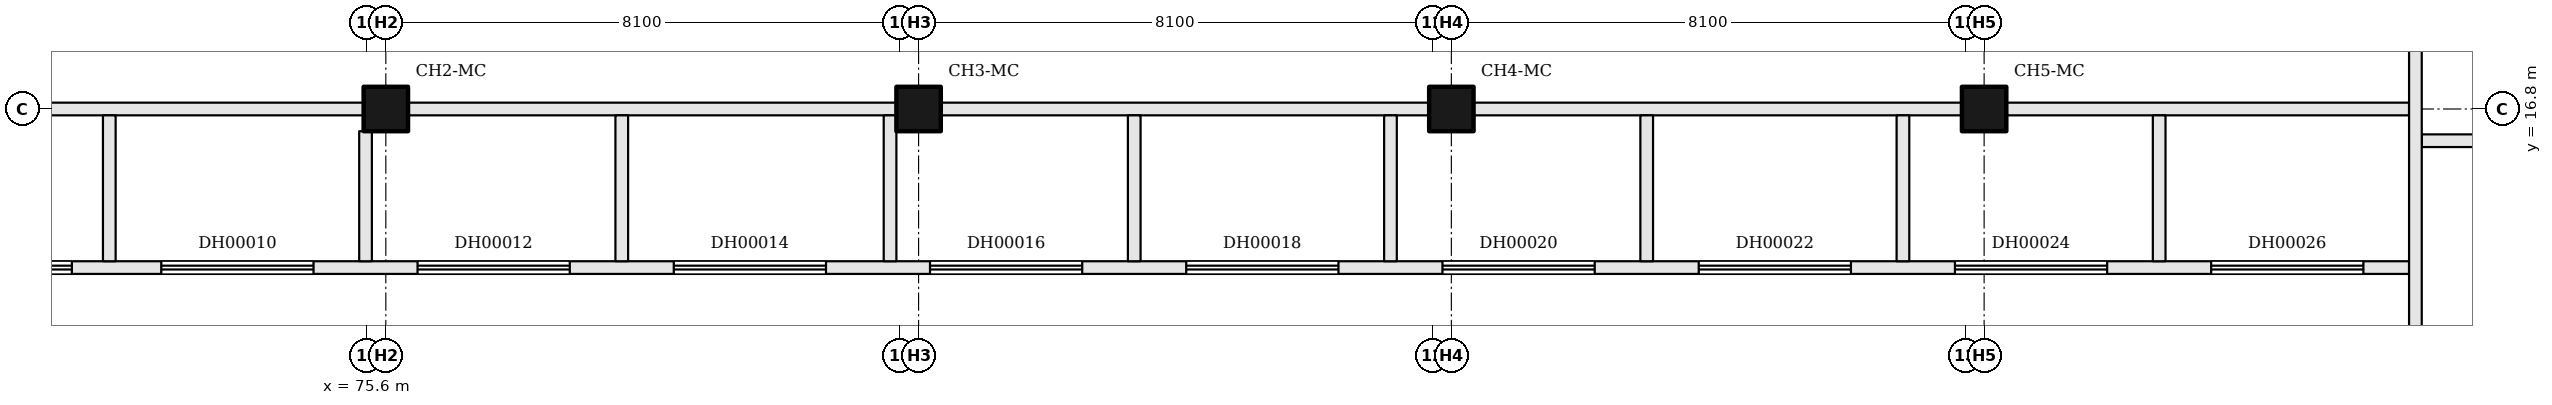
"""IFC4 building model, lengths in metres.
Left out: names, types, materials, properties, quantities, classifications, styles, units other than length and angle.
Written with IfcOpenShell. Run it as: python <this file> out.ifc"""

import sys

from ifc_helpers import new_model, si_unit, direction, frame, frame_2d, origin, origin_2d, place, context, subcontext, project, spatial, rectangle, extrude, element, fill, save


model = new_model("IFC4")
c1 = context("Model", 3, precision=1e-05, world=origin(), true_north=direction((0.0, 1.0)))
c2 = subcontext(c1, "Body", "Model", "MODEL_VIEW")
j1 = project(units=[si_unit("LENGTHUNIT", "METRE"), si_unit("PLANEANGLEUNIT", "RADIAN")], contexts=[c1])
p1 = place(None, origin())
s1 = spatial("IfcSite", under=j1, at=p1, CompositionType="ELEMENT")
p2 = place(p1, origin())
s2 = spatial("IfcBuilding", under=s1, at=p2, CompositionType="ELEMENT")
p3 = place(p2, origin())
s3 = spatial("IfcBuildingStorey", under=s2, at=p3, CompositionType="ELEMENT", Elevation=0.0)
for number, where, z_axis, x_axis in (
    (1, (75.9, 16.8, -0.2), (0.0, 0.0, 1.0), (1.0, 0.0, 0.0)),
    (2, (84.3, 16.8, -0.2), (0.0, 0.0, 1.0), (1.0, 0.0, 0.0)),
    (3, (92.7, 16.8, -0.2), (0.0, 0.0, 1.0), (1.0, 0.0, 0.0)),
    (4, (101.1, 16.8, -0.2), (0.0, 0.0, 1.0), (1.0, 0.0, 0.0)),
):
    element("IfcColumn", number, at=place(p3, frame(where, z_axis=z_axis, x_axis=x_axis)), inside=s3, PredefinedType="COLUMN", context=c2, shape_type="SweptSolid", body=[
        extrude(rectangle(XDim=0.7, YDim=0.7, at=origin_2d()), origin(), (0.0, 0.0, 1.0), 8.9),
    ])
p4 = place(p3, frame((68.35, 14.3, 0.0), z_axis=(0.0, 0.0, 1.0), x_axis=(1.0, 0.0, 0.0)))
e5 = element("IfcWall", 5, at=p4, inside=s3, PredefinedType="PARTITIONING", context=c2, shape_type="SweptSolid", body=[
    extrude(rectangle(XDim=39.45, YDim=0.2, at=frame_2d((19.725, 0.0))), origin(), (0.0, 0.0, 1.0), 8.7),
])
p5 = place(p4, frame((0.2, 0.0, 0.0)))
e6 = element("IfcOpeningElement", 6, at=p5, cuts=e5, PredefinedType="OPENING", context=c2, shape_type="SweptSolid", body=[
    extrude(rectangle(XDim=2.4, YDim=2.4, at=frame_2d((1.2, 1.2))), frame((0.0, 0.11, 0.0), z_axis=(0.0, -1.0, 0.0), x_axis=(1.0, 0.0, 0.0)), (0.0, 0.0, 1.0), 0.22),
])
p6 = place(p4, frame((4.01, 0.0, 0.0)))
e7 = element("IfcOpeningElement", 7, at=p6, cuts=e5, PredefinedType="OPENING", context=c2, shape_type="SweptSolid", body=[
    extrude(rectangle(XDim=2.4, YDim=2.4, at=frame_2d((1.2, 1.2))), frame((0.0, 0.11, 0.0), z_axis=(0.0, -1.0, 0.0), x_axis=(1.0, 0.0, 0.0)), (0.0, 0.0, 1.0), 0.22),
])
p7 = place(p4, frame((8.05, 0.0, 0.0)))
e8 = element("IfcOpeningElement", 8, at=p7, cuts=e5, PredefinedType="OPENING", context=c2, shape_type="SweptSolid", body=[
    extrude(rectangle(XDim=2.4, YDim=2.4, at=frame_2d((1.2, 1.2))), frame((0.0, 0.11, 0.0), z_axis=(0.0, -1.0, 0.0), x_axis=(1.0, 0.0, 0.0)), (0.0, 0.0, 1.0), 0.22),
])
p8 = place(p4, frame((12.09, 0.0, 0.0)))
e9 = element("IfcOpeningElement", 9, at=p8, cuts=e5, PredefinedType="OPENING", context=c2, shape_type="SweptSolid", body=[
    extrude(rectangle(XDim=2.4, YDim=2.4, at=frame_2d((1.2, 1.2))), frame((0.0, 0.11, 0.0), z_axis=(0.0, -1.0, 0.0), x_axis=(1.0, 0.0, 0.0)), (0.0, 0.0, 1.0), 0.22),
])
p9 = place(p4, frame((16.13, 0.0, 0.0)))
e10 = element("IfcOpeningElement", 10, at=p9, cuts=e5, PredefinedType="OPENING", context=c2, shape_type="SweptSolid", body=[
    extrude(rectangle(XDim=2.4, YDim=2.4, at=frame_2d((1.2, 1.2))), frame((0.0, 0.11, 0.0), z_axis=(0.0, -1.0, 0.0), x_axis=(1.0, 0.0, 0.0)), (0.0, 0.0, 1.0), 0.22),
])
p10 = place(p4, frame((20.17, 0.0, 0.0)))
e11 = element("IfcOpeningElement", 11, at=p10, cuts=e5, PredefinedType="OPENING", context=c2, shape_type="SweptSolid", body=[
    extrude(rectangle(XDim=2.4, YDim=2.4, at=frame_2d((1.2, 1.2))), frame((0.0, 0.11, 0.0), z_axis=(0.0, -1.0, 0.0), x_axis=(1.0, 0.0, 0.0)), (0.0, 0.0, 1.0), 0.22),
])
p11 = place(p4, frame((24.21, 0.0, 0.0)))
e12 = element("IfcOpeningElement", 12, at=p11, cuts=e5, PredefinedType="OPENING", context=c2, shape_type="SweptSolid", body=[
    extrude(rectangle(XDim=2.4, YDim=2.4, at=frame_2d((1.2, 1.2))), frame((0.0, 0.11, 0.0), z_axis=(0.0, -1.0, 0.0), x_axis=(1.0, 0.0, 0.0)), (0.0, 0.0, 1.0), 0.22),
])
p12 = place(p4, frame((28.25, 0.0, 0.0)))
e13 = element("IfcOpeningElement", 13, at=p12, cuts=e5, PredefinedType="OPENING", context=c2, shape_type="SweptSolid", body=[
    extrude(rectangle(XDim=2.4, YDim=2.4, at=frame_2d((1.2, 1.2))), frame((0.0, 0.11, 0.0), z_axis=(0.0, -1.0, 0.0), x_axis=(1.0, 0.0, 0.0)), (0.0, 0.0, 1.0), 0.22),
])
p13 = place(p4, frame((32.29, 0.0, 0.0)))
e14 = element("IfcOpeningElement", 14, at=p13, cuts=e5, PredefinedType="OPENING", context=c2, shape_type="SweptSolid", body=[
    extrude(rectangle(XDim=2.4, YDim=2.4, at=frame_2d((1.2, 1.2))), frame((0.0, 0.11, 0.0), z_axis=(0.0, -1.0, 0.0), x_axis=(1.0, 0.0, 0.0)), (0.0, 0.0, 1.0), 0.22),
])
p14 = place(p4, frame((36.33, 0.0, 0.0)))
e15 = element("IfcOpeningElement", 15, at=p14, cuts=e5, PredefinedType="OPENING", context=c2, shape_type="SweptSolid", body=[
    extrude(rectangle(XDim=2.4, YDim=2.4, at=frame_2d((1.2, 1.2))), frame((0.0, 0.11, 0.0), z_axis=(0.0, -1.0, 0.0), x_axis=(1.0, 0.0, 0.0)), (0.0, 0.0, 1.0), 0.22),
])
p15 = place(p3, frame((108.0, 16.3, 0.0), z_axis=(0.0, 0.0, 1.0), x_axis=(1.0, 0.0, 0.0)))
e16 = element("IfcWall", 16, at=p15, inside=s3, PredefinedType="PARTITIONING", context=c2, shape_type="SweptSolid", body=[
    extrude(rectangle(XDim=9.9, YDim=0.2, at=frame_2d((4.95, 0.0))), origin(), (0.0, 0.0, 1.0), 8.7),
])
p16 = place(p15, frame((1.7, 0.0, 0.0)))
e17 = element("IfcOpeningElement", 17, at=p16, cuts=e16, PredefinedType="OPENING", context=c2, shape_type="SweptSolid", body=[
    extrude(rectangle(XDim=1.4, YDim=2.1, at=frame_2d((0.7, 1.05))), frame((0.0, 0.11, 0.0), z_axis=(0.0, -1.0, 0.0), x_axis=(1.0, 0.0, 0.0)), (0.0, 0.0, 1.0), 0.22),
])
p17 = place(p15, frame((6.7, 0.0, 0.0)))
e18 = element("IfcOpeningElement", 18, at=p17, cuts=e16, PredefinedType="OPENING", context=c2, shape_type="SweptSolid", body=[
    extrude(rectangle(XDim=1.4, YDim=2.1, at=frame_2d((0.7, 1.05))), frame((0.0, 0.11, 0.0), z_axis=(0.0, -1.0, 0.0), x_axis=(1.0, 0.0, 0.0)), (0.0, 0.0, 1.0), 0.22),
])
p18 = place(p3, frame((69.05, 16.8, 0.0), z_axis=(0.0, 0.0, 1.0), x_axis=(1.0, 0.0, 0.0)))
e19 = element("IfcWall", 19, at=p18, inside=s3, PredefinedType="PARTITIONING", context=c2, shape_type="SweptSolid", body=[
    extrude(rectangle(XDim=6.5, YDim=0.2, at=frame_2d((3.25, 0.0))), origin(), (0.0, 0.0, 1.0), 8.7),
])
p19 = place(p3, frame((76.25, 16.8, 0.0), z_axis=(0.0, 0.0, 1.0), x_axis=(1.0, 0.0, 0.0)))
e20 = element("IfcWall", 20, at=p19, inside=s3, PredefinedType="PARTITIONING", context=c2, shape_type="SweptSolid", body=[
    extrude(rectangle(XDim=7.7, YDim=0.2, at=frame_2d((3.85, 0.0))), origin(), (0.0, 0.0, 1.0), 8.7),
])
p20 = place(p3, frame((84.65, 16.8, 0.0), z_axis=(0.0, 0.0, 1.0), x_axis=(1.0, 0.0, 0.0)))
e21 = element("IfcWall", 21, at=p20, inside=s3, PredefinedType="PARTITIONING", context=c2, shape_type="SweptSolid", body=[
    extrude(rectangle(XDim=7.7, YDim=0.2, at=frame_2d((3.85, 0.0))), origin(), (0.0, 0.0, 1.0), 8.7),
])
p21 = place(p3, frame((93.05, 16.8, 0.0), z_axis=(0.0, 0.0, 1.0), x_axis=(1.0, 0.0, 0.0)))
e22 = element("IfcWall", 22, at=p21, inside=s3, PredefinedType="PARTITIONING", context=c2, shape_type="SweptSolid", body=[
    extrude(rectangle(XDim=7.7, YDim=0.2, at=frame_2d((3.85, 0.0))), origin(), (0.0, 0.0, 1.0), 8.7),
])
p22 = place(p3, frame((101.45, 16.8, 0.0), z_axis=(0.0, 0.0, 1.0), x_axis=(1.0, 0.0, 0.0)))
e23 = element("IfcWall", 23, at=p22, inside=s3, PredefinedType="PARTITIONING", context=c2, shape_type="SweptSolid", body=[
    extrude(rectangle(XDim=6.35, YDim=0.2, at=frame_2d((3.175, 0.0))), origin(), (0.0, 0.0, 1.0), 8.7),
])
p23 = place(p3, frame((71.54, 14.4, 0.0), z_axis=(0.0, 0.0, 1.0), x_axis=(0.0, 1.0, 0.0)))
e24 = element("IfcWall", 24, at=p23, inside=s3, PredefinedType="PARTITIONING", context=c2, shape_type="SweptSolid", body=[
    extrude(rectangle(XDim=2.3, YDim=0.2, at=frame_2d((1.15, 0.0))), origin(), (0.0, 0.0, 1.0), 8.7),
])
p24 = place(p3, frame((75.58, 14.4, 0.0), z_axis=(0.0, 0.0, 1.0), x_axis=(0.0, 1.0, 0.0)))
e25 = element("IfcWall", 25, at=p24, inside=s3, PredefinedType="PARTITIONING", context=c2, shape_type="SweptSolid", body=[
    extrude(rectangle(XDim=2.05, YDim=0.2, at=frame_2d((1.025, 0.0))), origin(), (0.0, 0.0, 1.0), 8.7),
])
for number, where, z_axis, x_axis in (
    (26, (79.62, 14.4, 0.0), (0.0, 0.0, 1.0), (0.0, 1.0, 0.0)),
    (27, (83.85, 14.4, 0.0), (0.0, 0.0, 1.0), (0.0, 1.0, 0.0)),
    (28, (87.7, 14.4, 0.0), (0.0, 0.0, 1.0), (0.0, 1.0, 0.0)),
    (29, (91.74, 14.4, 0.0), (0.0, 0.0, 1.0), (0.0, 1.0, 0.0)),
    (30, (95.78, 14.4, 0.0), (0.0, 0.0, 1.0), (0.0, 1.0, 0.0)),
    (31, (99.82, 14.4, 0.0), (0.0, 0.0, 1.0), (0.0, 1.0, 0.0)),
    (32, (103.86, 14.4, 0.0), (0.0, 0.0, 1.0), (0.0, 1.0, 0.0)),
):
    element("IfcWall", number, at=place(p3, frame(where, z_axis=z_axis, x_axis=x_axis)), inside=s3, PredefinedType="PARTITIONING", context=c2, shape_type="SweptSolid", body=[
        extrude(rectangle(XDim=2.3, YDim=0.2, at=frame_2d((1.15, 0.0))), origin(), (0.0, 0.0, 1.0), 8.7),
    ])
p25 = place(p3, frame((107.9, 8.5, 0.0), z_axis=(0.0, 0.0, 1.0), x_axis=(0.0, 1.0, 0.0)))
e33 = element("IfcWall", 33, at=p25, inside=s3, PredefinedType="PARTITIONING", context=c2, shape_type="SweptSolid", body=[
    extrude(rectangle(XDim=25.1, YDim=0.2, at=frame_2d((12.55, 0.0))), origin(), (0.0, 0.0, 1.0), 8.7),
])
p26 = place(p25, frame((3.8, 0.0, 0.0)))
e34 = element("IfcOpeningElement", 34, at=p26, cuts=e33, PredefinedType="OPENING", context=c2, shape_type="SweptSolid", body=[
    extrude(rectangle(XDim=1.0, YDim=2.1, at=frame_2d((0.5, 1.05))), frame((0.0, 0.11, 0.0), z_axis=(0.0, -1.0, 0.0), x_axis=(1.0, 0.0, 0.0)), (0.0, 0.0, 1.0), 0.22),
])
p27 = place(p25, frame((10.0, 0.0, 0.0)))
e35 = element("IfcOpeningElement", 35, at=p27, cuts=e33, PredefinedType="OPENING", context=c2, shape_type="SweptSolid", body=[
    extrude(rectangle(XDim=1.0, YDim=2.1, at=frame_2d((0.5, 1.05))), frame((0.0, 0.11, 0.0), z_axis=(0.0, -1.0, 0.0), x_axis=(1.0, 0.0, 0.0)), (0.0, 0.0, 1.0), 0.22),
])
p28 = place(p25, frame((22.5, 0.0, 0.0)))
e36 = element("IfcOpeningElement", 36, at=p28, cuts=e33, PredefinedType="OPENING", context=c2, shape_type="SweptSolid", body=[
    extrude(rectangle(XDim=1.0, YDim=2.1, at=frame_2d((0.5, 1.05))), frame((0.0, 0.11, 0.0), z_axis=(0.0, -1.0, 0.0), x_axis=(1.0, 0.0, 0.0)), (0.0, 0.0, 1.0), 0.22),
])
p29 = place(p5, origin())
e37 = element("IfcDoor", 37, at=p29, inside=s3, OperationType="ROLLINGUP", PredefinedType="DOOR", context=c2, shape_type="SweptSolid", body=[
    extrude(rectangle(XDim=2.4, YDim=2.4, at=frame_2d((1.2, 1.2))), frame((0.0, 0.025, 0.0), z_axis=(0.0, -1.0, 0.0), x_axis=(1.0, 0.0, 0.0)), (0.0, 0.0, 1.0), 0.05),
])
fill(e6, e37)
p30 = place(p6, origin())
e38 = element("IfcDoor", 38, at=p30, inside=s3, OperationType="ROLLINGUP", PredefinedType="DOOR", context=c2, shape_type="SweptSolid", body=[
    extrude(rectangle(XDim=2.4, YDim=2.4, at=frame_2d((1.2, 1.2))), frame((0.0, 0.025, 0.0), z_axis=(0.0, -1.0, 0.0), x_axis=(1.0, 0.0, 0.0)), (0.0, 0.0, 1.0), 0.05),
])
fill(e7, e38)
p31 = place(p7, origin())
e39 = element("IfcDoor", 39, at=p31, inside=s3, OperationType="ROLLINGUP", PredefinedType="DOOR", context=c2, shape_type="SweptSolid", body=[
    extrude(rectangle(XDim=2.4, YDim=2.4, at=frame_2d((1.2, 1.2))), frame((0.0, 0.025, 0.0), z_axis=(0.0, -1.0, 0.0), x_axis=(1.0, 0.0, 0.0)), (0.0, 0.0, 1.0), 0.05),
])
fill(e8, e39)
p32 = place(p8, origin())
e40 = element("IfcDoor", 40, at=p32, inside=s3, OperationType="ROLLINGUP", PredefinedType="DOOR", context=c2, shape_type="SweptSolid", body=[
    extrude(rectangle(XDim=2.4, YDim=2.4, at=frame_2d((1.2, 1.2))), frame((0.0, 0.025, 0.0), z_axis=(0.0, -1.0, 0.0), x_axis=(1.0, 0.0, 0.0)), (0.0, 0.0, 1.0), 0.05),
])
fill(e9, e40)
p33 = place(p9, origin())
e41 = element("IfcDoor", 41, at=p33, inside=s3, OperationType="ROLLINGUP", PredefinedType="DOOR", context=c2, shape_type="SweptSolid", body=[
    extrude(rectangle(XDim=2.4, YDim=2.4, at=frame_2d((1.2, 1.2))), frame((0.0, 0.025, 0.0), z_axis=(0.0, -1.0, 0.0), x_axis=(1.0, 0.0, 0.0)), (0.0, 0.0, 1.0), 0.05),
])
fill(e10, e41)
p34 = place(p10, origin())
e42 = element("IfcDoor", 42, at=p34, inside=s3, OperationType="ROLLINGUP", PredefinedType="DOOR", context=c2, shape_type="SweptSolid", body=[
    extrude(rectangle(XDim=2.4, YDim=2.4, at=frame_2d((1.2, 1.2))), frame((0.0, 0.025, 0.0), z_axis=(0.0, -1.0, 0.0), x_axis=(1.0, 0.0, 0.0)), (0.0, 0.0, 1.0), 0.05),
])
fill(e11, e42)
p35 = place(p11, origin())
e43 = element("IfcDoor", 43, at=p35, inside=s3, OperationType="ROLLINGUP", PredefinedType="DOOR", context=c2, shape_type="SweptSolid", body=[
    extrude(rectangle(XDim=2.4, YDim=2.4, at=frame_2d((1.2, 1.2))), frame((0.0, 0.025, 0.0), z_axis=(0.0, -1.0, 0.0), x_axis=(1.0, 0.0, 0.0)), (0.0, 0.0, 1.0), 0.05),
])
fill(e12, e43)
p36 = place(p12, origin())
e44 = element("IfcDoor", 44, at=p36, inside=s3, OperationType="ROLLINGUP", PredefinedType="DOOR", context=c2, shape_type="SweptSolid", body=[
    extrude(rectangle(XDim=2.4, YDim=2.4, at=frame_2d((1.2, 1.2))), frame((0.0, 0.025, 0.0), z_axis=(0.0, -1.0, 0.0), x_axis=(1.0, 0.0, 0.0)), (0.0, 0.0, 1.0), 0.05),
])
fill(e13, e44)
p37 = place(p13, origin())
e45 = element("IfcDoor", 45, at=p37, inside=s3, OperationType="ROLLINGUP", PredefinedType="DOOR", context=c2, shape_type="SweptSolid", body=[
    extrude(rectangle(XDim=2.4, YDim=2.4, at=frame_2d((1.2, 1.2))), frame((0.0, 0.025, 0.0), z_axis=(0.0, -1.0, 0.0), x_axis=(1.0, 0.0, 0.0)), (0.0, 0.0, 1.0), 0.05),
])
fill(e14, e45)
p38 = place(p14, origin())
e46 = element("IfcDoor", 46, at=p38, inside=s3, OperationType="ROLLINGUP", PredefinedType="DOOR", context=c2, shape_type="SweptSolid", body=[
    extrude(rectangle(XDim=2.4, YDim=2.4, at=frame_2d((1.2, 1.2))), frame((0.0, 0.025, 0.0), z_axis=(0.0, -1.0, 0.0), x_axis=(1.0, 0.0, 0.0)), (0.0, 0.0, 1.0), 0.05),
])
fill(e15, e46)
save(model, sys.argv[1])
